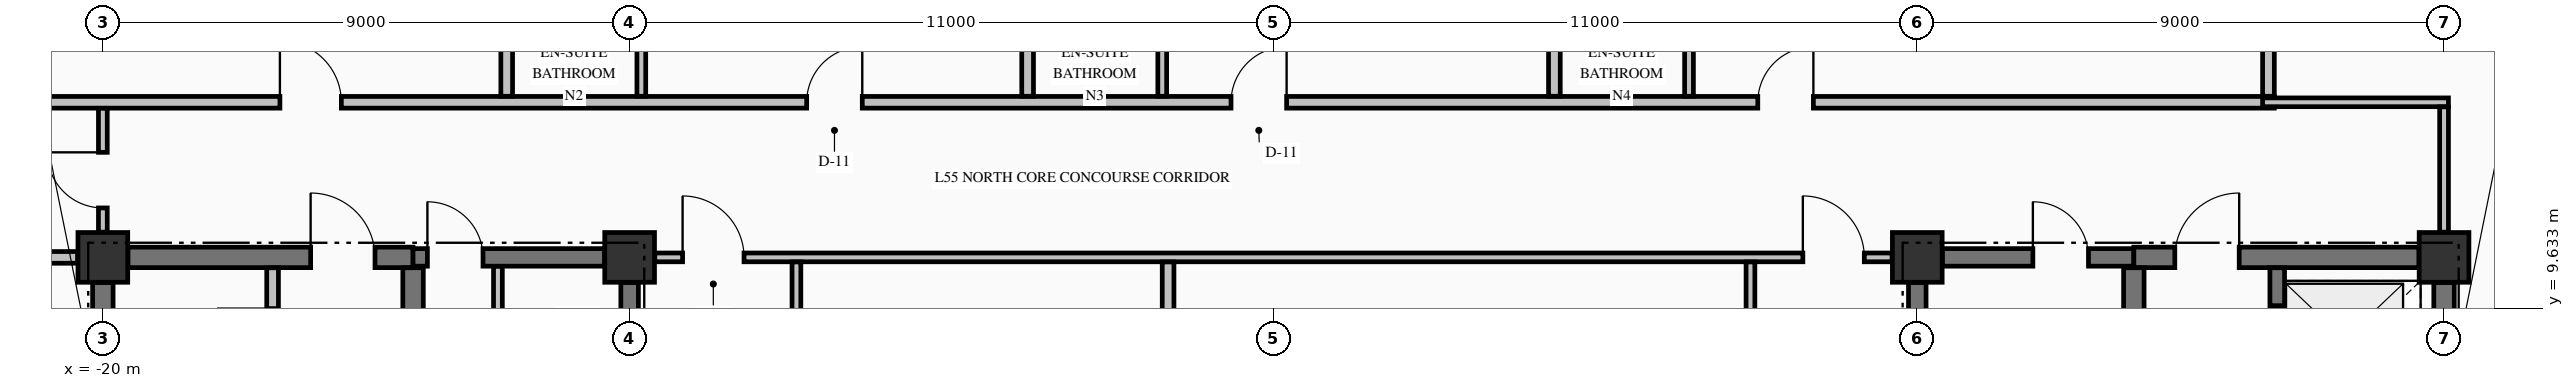
"""IFC4 building model, lengths in metres.
Left out: names, types, materials, properties, quantities, classifications, styles, units other than length and angle.
Written with IfcOpenShell. Run it as: python <this file> out.ifc"""

import sys

from ifc_helpers import new_model, si_unit, direction, frame, frame_2d, origin, origin_2d, place, context, subcontext, project, spatial, rectangle, extrude, element, fill, save


model = new_model("IFC4")
c1 = context("Model", 3, precision=1e-05, world=origin(), true_north=direction((0.0, 1.0)))
c2 = subcontext(c1, "Body", "Model", "MODEL_VIEW")
j1 = project(units=[si_unit("LENGTHUNIT", "METRE"), si_unit("PLANEANGLEUNIT", "RADIAN")], contexts=[c1])
p1 = place(None, origin())
s1 = spatial("IfcSite", under=j1, at=p1, CompositionType="ELEMENT")
p2 = place(p1, origin())
s2 = spatial("IfcBuilding", under=s1, at=p2, CompositionType="ELEMENT")
p3 = place(p2, frame((0.0, 0.0, 211.86)))
s3 = spatial("IfcBuildingStorey", under=s2, at=p3, CompositionType="ELEMENT", Elevation=211.86)
for number, where, z_axis, x_axis in (
    (1, (-20.0, 10.5, -0.325), (0.0, 0.0, 1.0), (1.0, 0.0, 0.0)),
    (2, (-11.0, 10.5, -0.325), (0.0, 0.0, 1.0), (1.0, 0.0, 0.0)),
    (3, (11.0, 10.5, -0.325), (0.0, 0.0, 1.0), (1.0, 0.0, 0.0)),
    (4, (20.0, 10.5, -0.325), (0.0, 0.0, 1.0), (1.0, 0.0, 0.0)),
):
    element("IfcColumn", number, at=place(p3, frame(where, z_axis=z_axis, x_axis=x_axis)), inside=s3, PredefinedType="COLUMN", context=c2, shape_type="SweptSolid", body=[
        extrude(rectangle(XDim=0.85, YDim=0.85, at=origin_2d()), origin(), (0.0, 0.0, 1.0), 3.475),
    ])
p4 = place(p3, frame((-19.571, 10.5, 0.0), z_axis=(0.0, 0.0, 1.0), x_axis=(1.0, 0.0, 0.0)))
e5 = element("IfcWall", 5, at=p4, inside=s3, PredefinedType="SHEAR", context=c2, shape_type="SweptSolid", body=[
    extrude(rectangle(XDim=4.871, YDim=0.35, at=frame_2d((2.436, 0.0))), origin(), (0.0, 0.0, 1.0), 3.15),
])
p5 = place(p4, frame((3.121, 0.0, 0.0)))
e6 = element("IfcOpeningElement", 6, at=p5, cuts=e5, PredefinedType="OPENING", context=c2, shape_type="SweptSolid", body=[
    extrude(rectangle(XDim=1.1, YDim=2.15, at=frame_2d((0.55, 1.075))), frame((0.0, 0.185, 0.0), z_axis=(0.0, -1.0, 0.0), x_axis=(1.0, 0.0, 0.0)), (0.0, 0.0, 1.0), 0.37),
])
p6 = place(p3, frame((-14.7, 10.5, 0.0), z_axis=(0.0, 0.0, 1.0), x_axis=(1.0, 0.0, 0.0)))
e7 = element("IfcWall", 7, at=p6, inside=s3, PredefinedType="SHEAR", context=c2, shape_type="SweptSolid", body=[
    extrude(rectangle(XDim=3.271, YDim=0.3, at=frame_2d((1.635, 0.0))), origin(), (0.0, 0.0, 1.0), 3.15),
])
p7 = place(p6, frame((0.245, 0.0, 0.0)))
e8 = element("IfcOpeningElement", 8, at=p7, cuts=e7, PredefinedType="OPENING", context=c2, shape_type="SweptSolid", body=[
    extrude(rectangle(XDim=0.95, YDim=2.15, at=frame_2d((0.475, 1.075))), frame((0.0, 0.16, 0.0), z_axis=(0.0, -1.0, 0.0), x_axis=(1.0, 0.0, 0.0)), (0.0, 0.0, 1.0), 0.32),
])
p8 = place(p3, frame((11.429, 10.5, 0.0), z_axis=(0.0, 0.0, 1.0), x_axis=(1.0, 0.0, 0.0)))
e9 = element("IfcWall", 9, at=p8, inside=s3, PredefinedType="SHEAR", context=c2, shape_type="SweptSolid", body=[
    extrude(rectangle(XDim=3.271, YDim=0.3, at=frame_2d((1.635, 0.0))), origin(), (0.0, 0.0, 1.0), 3.15),
])
p9 = place(p8, frame((1.546, 0.0, 0.0)))
e10 = element("IfcOpeningElement", 10, at=p9, cuts=e9, PredefinedType="OPENING", context=c2, shape_type="SweptSolid", body=[
    extrude(rectangle(XDim=0.95, YDim=2.15, at=frame_2d((0.475, 1.075))), frame((0.0, 0.16, 0.0), z_axis=(0.0, -1.0, 0.0), x_axis=(1.0, 0.0, 0.0)), (0.0, 0.0, 1.0), 0.32),
])
p10 = place(p3, frame((14.7, 10.5, 0.0), z_axis=(0.0, 0.0, 1.0), x_axis=(1.0, 0.0, 0.0)))
e11 = element("IfcWall", 11, at=p10, inside=s3, PredefinedType="SHEAR", context=c2, shape_type="SweptSolid", body=[
    extrude(rectangle(XDim=4.871, YDim=0.35, at=frame_2d((2.436, 0.0))), origin(), (0.0, 0.0, 1.0), 3.15),
])
p11 = place(p10, frame((0.7, 0.0, 0.0)))
e12 = element("IfcOpeningElement", 12, at=p11, cuts=e11, PredefinedType="OPENING", context=c2, shape_type="SweptSolid", body=[
    extrude(rectangle(XDim=1.1, YDim=2.15, at=frame_2d((0.55, 1.075))), frame((0.0, 0.185, 0.0), z_axis=(0.0, -1.0, 0.0), x_axis=(1.0, 0.0, 0.0)), (0.0, 0.0, 1.0), 0.37),
])
p12 = place(p3, frame((-26.835, 10.5, 0.0), z_axis=(0.0, 0.0, 1.0), x_axis=(1.0, 0.0, 0.0)))
e13 = element("IfcWall", 13, at=p12, inside=s3, PredefinedType="PARTITIONING", context=c2, shape_type="SweptSolid", body=[
    extrude(rectangle(XDim=6.404, YDim=0.2, at=frame_2d((3.202, 0.0))), origin(), (0.0, 0.0, 1.0), 3.15),
])
p13 = place(p12, frame((2.86, 0.0, 0.0)))
e14 = element("IfcOpeningElement", 14, at=p13, cuts=e13, PredefinedType="OPENING", context=c2, shape_type="SweptSolid", body=[
    extrude(rectangle(XDim=0.95, YDim=2.15, at=frame_2d((0.475, 1.075))), frame((0.0, 0.11, 0.0), z_axis=(0.0, -1.0, 0.0), x_axis=(1.0, 0.0, 0.0)), (0.0, 0.0, 1.0), 0.22),
])
p14 = place(p3, frame((-10.569, 10.5, 0.0), z_axis=(0.0, 0.0, 1.0), x_axis=(1.0, 0.0, 0.0)))
e15 = element("IfcWall", 15, at=p14, inside=s3, PredefinedType="PARTITIONING", context=c2, shape_type="SweptSolid", body=[
    extrude(rectangle(XDim=21.138, YDim=0.15, at=frame_2d((10.569, 0.0))), origin(), (0.0, 0.0, 1.0), 3.15),
])
p15 = place(p14, frame((0.474, 0.0, 0.0)))
e16 = element("IfcOpeningElement", 16, at=p15, cuts=e15, PredefinedType="OPENING", context=c2, shape_type="SweptSolid", body=[
    extrude(rectangle(XDim=1.05, YDim=2.15, at=frame_2d((0.525, 1.075))), frame((0.0, 0.085, 0.0), z_axis=(0.0, -1.0, 0.0), x_axis=(1.0, 0.0, 0.0)), (0.0, 0.0, 1.0), 0.17),
])
p16 = place(p14, frame((19.614, 0.0, 0.0)))
e17 = element("IfcOpeningElement", 17, at=p16, cuts=e15, PredefinedType="OPENING", context=c2, shape_type="SweptSolid", body=[
    extrude(rectangle(XDim=1.05, YDim=2.15, at=frame_2d((0.525, 1.075))), frame((0.0, 0.085, 0.0), z_axis=(0.0, -1.0, 0.0), x_axis=(1.0, 0.0, 0.0)), (0.0, 0.0, 1.0), 0.17),
])
p17 = place(p3, frame((-22.1, 13.15, 0.0), z_axis=(0.0, 0.0, 1.0), x_axis=(1.0, 0.0, 0.0)))
e18 = element("IfcWall", 18, at=p17, inside=s3, PredefinedType="PARTITIONING", context=c2, shape_type="SweptSolid", body=[
    extrude(rectangle(XDim=39.2, YDim=0.2, at=frame_2d((19.6, 0.0))), origin(), (0.0, 0.0, 1.0), 3.15),
])
p18 = place(p17, frame((5.125, 0.0, 0.0)))
e19 = element("IfcOpeningElement", 19, at=p18, cuts=e18, PredefinedType="OPENING", context=c2, shape_type="SweptSolid", body=[
    extrude(rectangle(XDim=1.05, YDim=2.15, at=frame_2d((0.525, 1.075))), frame((0.0, 0.11, 0.0), z_axis=(0.0, -1.0, 0.0), x_axis=(1.0, 0.0, 0.0)), (0.0, 0.0, 1.0), 0.22),
])
p19 = place(p17, frame((14.125, 0.0, 0.0)))
e20 = element("IfcOpeningElement", 20, at=p19, cuts=e18, PredefinedType="OPENING", context=c2, shape_type="SweptSolid", body=[
    extrude(rectangle(XDim=0.95, YDim=2.15, at=frame_2d((0.475, 1.075))), frame((0.0, 0.11, 0.0), z_axis=(0.0, -1.0, 0.0), x_axis=(1.0, 0.0, 0.0)), (0.0, 0.0, 1.0), 0.22),
])
p20 = place(p17, frame((21.375, 0.0, 0.0)))
e21 = element("IfcOpeningElement", 21, at=p20, cuts=e18, PredefinedType="OPENING", context=c2, shape_type="SweptSolid", body=[
    extrude(rectangle(XDim=0.95, YDim=2.15, at=frame_2d((0.475, 1.075))), frame((0.0, 0.11, 0.0), z_axis=(0.0, -1.0, 0.0), x_axis=(1.0, 0.0, 0.0)), (0.0, 0.0, 1.0), 0.22),
])
p21 = place(p17, frame((30.375, 0.0, 0.0)))
e22 = element("IfcOpeningElement", 22, at=p21, cuts=e18, PredefinedType="OPENING", context=c2, shape_type="SweptSolid", body=[
    extrude(rectangle(XDim=0.95, YDim=2.15, at=frame_2d((0.475, 1.075))), frame((0.0, 0.11, 0.0), z_axis=(0.0, -1.0, 0.0), x_axis=(1.0, 0.0, 0.0)), (0.0, 0.0, 1.0), 0.22),
])
p22 = place(p3, frame((16.9, 13.15, 0.0), z_axis=(0.0, 0.0, 1.0), x_axis=(1.0, 0.0, 0.0)))
e23 = element("IfcWall", 23, at=p22, inside=s3, PredefinedType="PARTITIONING", context=c2, shape_type="SweptSolid", body=[
    extrude(rectangle(XDim=3.175, YDim=0.15, at=frame_2d((1.587, 0.0))), origin(), (0.0, 0.0, 1.0), 3.15),
])
p23 = place(p3, frame((-20.0, 5.327, 0.0), z_axis=(0.0, 0.0, 1.0), x_axis=(0.0, 1.0, 0.0)))
e24 = element("IfcWall", 24, at=p23, inside=s3, PredefinedType="SHEAR", context=c2, shape_type="SweptSolid", body=[
    extrude(rectangle(XDim=4.744, YDim=0.35, at=frame_2d((2.372, 0.0))), origin(), (0.0, 0.0, 1.0), 3.15),
])
p24 = place(p3, frame((-14.7, 5.852, 0.0), z_axis=(0.0, 0.0, 1.0), x_axis=(0.0, 1.0, 0.0)))
e25 = element("IfcWall", 25, at=p24, inside=s3, PredefinedType="SHEAR", context=c2, shape_type="SweptSolid", body=[
    extrude(rectangle(XDim=4.471, YDim=0.35, at=frame_2d((2.235, 0.0))), origin(), (0.0, 0.0, 1.0), 3.15),
])
for number, where, z_axis, x_axis in (
    (26, (-11.0, 5.852, 0.0), (0.0, 0.0, 1.0), (0.0, 1.0, 0.0)),
    (27, (11.0, 5.852, 0.0), (0.0, 0.0, 1.0), (0.0, 1.0, 0.0)),
):
    element("IfcWall", number, at=place(p3, frame(where, z_axis=z_axis, x_axis=x_axis)), inside=s3, PredefinedType="SHEAR", context=c2, shape_type="SweptSolid", body=[
        extrude(rectangle(XDim=4.219, YDim=0.3, at=frame_2d((2.109, 0.0))), origin(), (0.0, 0.0, 1.0), 3.15),
    ])
p25 = place(p3, frame((14.7, 5.852, 0.0), z_axis=(0.0, 0.0, 1.0), x_axis=(0.0, 1.0, 0.0)))
e28 = element("IfcWall", 28, at=p25, inside=s3, PredefinedType="SHEAR", context=c2, shape_type="SweptSolid", body=[
    extrude(rectangle(XDim=4.471, YDim=0.35, at=frame_2d((2.235, 0.0))), origin(), (0.0, 0.0, 1.0), 3.15),
])
p26 = place(p3, frame((17.15, 7.877, 0.0), z_axis=(0.0, 0.0, 1.0), x_axis=(0.0, 1.0, 0.0)))
e29 = element("IfcWall", 29, at=p26, inside=s3, PredefinedType="SOLIDWALL", context=c2, shape_type="SweptSolid", body=[
    extrude(rectangle(XDim=2.446, YDim=0.25, at=frame_2d((1.223, 0.0))), origin(), (0.0, 0.0, 1.0), 3.15),
])
p27 = place(p26, frame((0.698, 0.0, 0.0)))
e30 = element("IfcOpeningElement", 30, at=p27, cuts=e29, PredefinedType="OPENING", context=c2, shape_type="SweptSolid", body=[
    extrude(rectangle(XDim=1.1, YDim=2.2, at=frame_2d((0.55, 1.1))), frame((0.0, 0.135, 0.0), z_axis=(0.0, -1.0, 0.0), x_axis=(1.0, 0.0, 0.0)), (0.0, 0.0, 1.0), 0.27),
])
p28 = place(p3, frame((20.0, 7.877, 0.0), z_axis=(0.0, 0.0, 1.0), x_axis=(0.0, 1.0, 0.0)))
e31 = element("IfcWall", 31, at=p28, inside=s3, PredefinedType="SHEAR", context=c2, shape_type="SweptSolid", body=[
    extrude(rectangle(XDim=2.194, YDim=0.35, at=frame_2d((1.097, 0.0))), origin(), (0.0, 0.0, 1.0), 3.15),
])
p29 = place(p3, frame((-20.0, 10.931, 0.0), z_axis=(0.0, 0.0, 1.0), x_axis=(0.0, 1.0, 0.0)))
e32 = element("IfcWall", 32, at=p29, inside=s3, PredefinedType="PARTITIONING", context=c2, shape_type="SweptSolid", body=[
    extrude(rectangle(XDim=2.116, YDim=0.15, at=frame_2d((1.058, 0.0))), origin(), (0.0, 0.0, 1.0), 2.342),
])
p30 = place(p29, frame((0.414, 0.0, 0.0)))
e33 = element("IfcOpeningElement", 33, at=p30, cuts=e32, PredefinedType="OPENING", context=c2, shape_type="SweptSolid", body=[
    extrude(rectangle(XDim=0.95, YDim=2.15, at=frame_2d((0.475, 1.075))), frame((0.0, 0.085, 0.0), z_axis=(0.0, -1.0, 0.0), x_axis=(1.0, 0.0, 0.0)), (0.0, 0.0, 1.0), 0.17),
])
p31 = place(p3, frame((-17.1, 7.928, 0.0), z_axis=(0.0, 0.0, 1.0), x_axis=(0.0, 1.0, 0.0)))
e34 = element("IfcWall", 34, at=p31, inside=s3, PredefinedType="PARTITIONING", context=c2, shape_type="SweptSolid", body=[
    extrude(rectangle(XDim=2.394, YDim=0.2, at=frame_2d((1.197, 0.0))), origin(), (0.0, 0.0, 1.0), 3.15),
])
p32 = place(p31, frame((0.747, 0.0, 0.0)))
e35 = element("IfcOpeningElement", 35, at=p32, cuts=e34, PredefinedType="OPENING", context=c2, shape_type="SweptSolid", body=[
    extrude(rectangle(XDim=0.95, YDim=2.15, at=frame_2d((0.475, 1.075))), frame((0.0, 0.11, 0.0), z_axis=(0.0, -1.0, 0.0), x_axis=(1.0, 0.0, 0.0)), (0.0, 0.0, 1.0), 0.22),
])
p33 = place(p3, frame((-13.25, 5.853, 0.0), z_axis=(0.0, 0.0, 1.0), x_axis=(0.0, 1.0, 0.0)))
e36 = element("IfcWall", 36, at=p33, inside=s3, PredefinedType="PARTITIONING", context=c2, shape_type="SweptSolid", body=[
    extrude(rectangle(XDim=4.494, YDim=0.15, at=frame_2d((2.247, 0.0))), origin(), (0.0, 0.0, 1.0), 3.15),
])
p34 = place(p33, frame((1.472, 0.0, 0.0)))
e37 = element("IfcOpeningElement", 37, at=p34, cuts=e36, PredefinedType="OPENING", context=c2, shape_type="SweptSolid", body=[
    extrude(rectangle(XDim=0.95, YDim=2.15, at=frame_2d((0.475, 1.075))), frame((0.0, 0.085, 0.0), z_axis=(0.0, -1.0, 0.0), x_axis=(1.0, 0.0, 0.0)), (0.0, 0.0, 1.0), 0.17),
])
p35 = place(p3, frame((-13.1, 13.253, 0.0), z_axis=(0.0, 0.0, 1.0), x_axis=(0.0, 1.0, 0.0)))
e38 = element("IfcWall", 38, at=p35, inside=s3, PredefinedType="PARTITIONING", context=c2, shape_type="SweptSolid", body=[
    extrude(rectangle(XDim=2.069, YDim=0.2, at=frame_2d((1.035, 0.0))), origin(), (0.0, 0.0, 1.0), 3.15),
])
p36 = place(p3, frame((-10.8, 13.253, 0.0), z_axis=(0.0, 0.0, 1.0), x_axis=(0.0, 1.0, 0.0)))
e39 = element("IfcWall", 39, at=p36, inside=s3, PredefinedType="PARTITIONING", context=c2, shape_type="SweptSolid", body=[
    extrude(rectangle(XDim=2.069, YDim=0.15, at=frame_2d((1.035, 0.0))), origin(), (0.0, 0.0, 1.0), 2.342),
])
p37 = place(p3, frame((-8.15, -2.497, 0.0), z_axis=(0.0, 0.0, 1.0), x_axis=(0.0, 1.0, 0.0)))
e40 = element("IfcWall", 40, at=p37, inside=s3, PredefinedType="PARTITIONING", context=c2, shape_type="SweptSolid", body=[
    extrude(rectangle(XDim=12.919, YDim=0.15, at=frame_2d((6.459, 0.0))), origin(), (0.0, 0.0, 1.0), 3.15),
])
p38 = place(p37, frame((5.897, 0.0, 0.0)))
e41 = element("IfcOpeningElement", 41, at=p38, cuts=e40, PredefinedType="OPENING", context=c2, shape_type="SweptSolid", body=[
    extrude(rectangle(XDim=1.1, YDim=2.15, at=frame_2d((0.55, 1.075))), frame((0.0, 0.085, 0.0), z_axis=(0.0, -1.0, 0.0), x_axis=(1.0, 0.0, 0.0)), (0.0, 0.0, 1.0), 0.17),
])
p39 = place(p3, frame((-4.2, 13.253, 0.0), z_axis=(0.0, 0.0, 1.0), x_axis=(0.0, 1.0, 0.0)))
e42 = element("IfcWall", 42, at=p39, inside=s3, PredefinedType="PARTITIONING", context=c2, shape_type="SweptSolid", body=[
    extrude(rectangle(XDim=2.069, YDim=0.2, at=frame_2d((1.035, 0.0))), origin(), (0.0, 0.0, 1.0), 3.15),
])
p40 = place(p3, frame((-1.9, 13.253, 0.0), z_axis=(0.0, 0.0, 1.0), x_axis=(0.0, 1.0, 0.0)))
e43 = element("IfcWall", 43, at=p40, inside=s3, PredefinedType="PARTITIONING", context=c2, shape_type="SweptSolid", body=[
    extrude(rectangle(XDim=2.069, YDim=0.15, at=frame_2d((1.035, 0.0))), origin(), (0.0, 0.0, 1.0), 3.15),
])
p41 = place(p3, frame((-1.8, -1.497, 0.0), z_axis=(0.0, 0.0, 1.0), x_axis=(0.0, 1.0, 0.0)))
e44 = element("IfcWall", 44, at=p41, inside=s3, PredefinedType="PARTITIONING", context=c2, shape_type="SweptSolid", body=[
    extrude(rectangle(XDim=11.919, YDim=0.2, at=frame_2d((5.959, 0.0))), origin(), (0.0, 0.0, 1.0), 3.15),
])
p42 = place(p3, frame((4.8, 13.253, 0.0), z_axis=(0.0, 0.0, 1.0), x_axis=(0.0, 1.0, 0.0)))
e45 = element("IfcWall", 45, at=p42, inside=s3, PredefinedType="PARTITIONING", context=c2, shape_type="SweptSolid", body=[
    extrude(rectangle(XDim=2.069, YDim=0.2, at=frame_2d((1.035, 0.0))), origin(), (0.0, 0.0, 1.0), 3.15),
])
p43 = place(p3, frame((7.1, 13.253, 0.0), z_axis=(0.0, 0.0, 1.0), x_axis=(0.0, 1.0, 0.0)))
e46 = element("IfcWall", 46, at=p43, inside=s3, PredefinedType="PARTITIONING", context=c2, shape_type="SweptSolid", body=[
    extrude(rectangle(XDim=2.069, YDim=0.15, at=frame_2d((1.035, 0.0))), origin(), (0.0, 0.0, 1.0), 3.15),
])
p44 = place(p3, frame((8.15, -1.497, 0.0), z_axis=(0.0, 0.0, 1.0), x_axis=(0.0, 1.0, 0.0)))
e47 = element("IfcWall", 47, at=p44, inside=s3, PredefinedType="PARTITIONING", context=c2, shape_type="SweptSolid", body=[
    extrude(rectangle(XDim=11.919, YDim=0.15, at=frame_2d((5.959, 0.0))), origin(), (0.0, 0.0, 1.0), 3.15),
])
p45 = place(p44, frame((5.397, 0.0, 0.0)))
e48 = element("IfcOpeningElement", 48, at=p45, cuts=e47, PredefinedType="OPENING", context=c2, shape_type="SweptSolid", body=[
    extrude(rectangle(XDim=1.1, YDim=2.15, at=frame_2d((0.55, 1.075))), frame((0.0, 0.085, 0.0), z_axis=(0.0, -1.0, 0.0), x_axis=(1.0, 0.0, 0.0)), (0.0, 0.0, 1.0), 0.17),
])
p46 = place(p3, frame((17.0, 13.253, 0.0), z_axis=(0.0, 0.0, 1.0), x_axis=(0.0, 1.0, 0.0)))
e49 = element("IfcWall", 49, at=p46, inside=s3, PredefinedType="PARTITIONING", context=c2, shape_type="SweptSolid", body=[
    extrude(rectangle(XDim=5.741, YDim=0.2, at=frame_2d((2.871, 0.0))), origin(), (0.0, 0.0, 1.0), 3.15),
])
p47 = place(p3, frame((20.0, 10.931, 0.0), z_axis=(0.0, 0.0, 1.0), x_axis=(0.0, 1.0, 0.0)))
e50 = element("IfcWall", 50, at=p47, inside=s3, PredefinedType="PARTITIONING", context=c2, shape_type="SweptSolid", body=[
    extrude(rectangle(XDim=2.141, YDim=0.15, at=frame_2d((1.071, 0.0))), origin(), (0.0, 0.0, 1.0), 2.342),
])
p48 = place(p7, origin())
e51 = element("IfcDoor", 51, at=p48, inside=s3, OperationType="SINGLE_SWING_LEFT", PredefinedType="DOOR", context=c2, shape_type="SweptSolid", body=[
    extrude(rectangle(XDim=0.95, YDim=2.15, at=frame_2d((0.475, 1.075))), frame((0.0, 0.025, 0.0), z_axis=(0.0, -1.0, 0.0), x_axis=(1.0, 0.0, 0.0)), (0.0, 0.0, 1.0), 0.05),
])
fill(e8, e51)
p49 = place(p9, origin())
e52 = element("IfcDoor", 52, at=p49, inside=s3, OperationType="SINGLE_SWING_LEFT", PredefinedType="DOOR", context=c2, shape_type="SweptSolid", body=[
    extrude(rectangle(XDim=0.95, YDim=2.15, at=frame_2d((0.475, 1.075))), frame((0.0, 0.025, 0.0), z_axis=(0.0, -1.0, 0.0), x_axis=(1.0, 0.0, 0.0)), (0.0, 0.0, 1.0), 0.05),
])
fill(e10, e52)
p50 = place(p5, origin())
e53 = element("IfcDoor", 53, at=p50, inside=s3, OperationType="SINGLE_SWING_LEFT", PredefinedType="DOOR", context=c2, shape_type="SweptSolid", body=[
    extrude(rectangle(XDim=1.1, YDim=2.15, at=frame_2d((0.55, 1.075))), frame((0.0, 0.025, 0.0), z_axis=(0.0, -1.0, 0.0), x_axis=(1.0, 0.0, 0.0)), (0.0, 0.0, 1.0), 0.05),
])
fill(e6, e53)
p51 = place(p27, origin())
e54 = element("IfcDoor", 54, at=p51, inside=s3, OperationType="SLIDING_TO_RIGHT", PredefinedType="DOOR", context=c2, shape_type="SweptSolid", body=[
    extrude(rectangle(XDim=1.1, YDim=2.2, at=frame_2d((0.55, 1.1))), frame((0.0, 0.025, 0.0), z_axis=(0.0, -1.0, 0.0), x_axis=(1.0, 0.0, 0.0)), (0.0, 0.0, 1.0), 0.05),
])
fill(e30, e54)
p52 = place(p11, origin())
e55 = element("IfcDoor", 55, at=p52, inside=s3, OperationType="SINGLE_SWING_RIGHT", PredefinedType="DOOR", context=c2, shape_type="SweptSolid", body=[
    extrude(rectangle(XDim=1.1, YDim=2.15, at=frame_2d((0.55, 1.075))), frame((0.0, 0.025, 0.0), z_axis=(0.0, -1.0, 0.0), x_axis=(1.0, 0.0, 0.0)), (0.0, 0.0, 1.0), 0.05),
])
fill(e12, e55)
p53 = place(p15, origin())
e56 = element("IfcDoor", 56, at=p53, inside=s3, OperationType="SINGLE_SWING_LEFT", PredefinedType="DOOR", context=c2, shape_type="SweptSolid", body=[
    extrude(rectangle(XDim=1.05, YDim=2.15, at=frame_2d((0.525, 1.075))), frame((0.0, 0.025, 0.0), z_axis=(0.0, -1.0, 0.0), x_axis=(1.0, 0.0, 0.0)), (0.0, 0.0, 1.0), 0.05),
])
fill(e16, e56)
p54 = place(p16, origin())
e57 = element("IfcDoor", 57, at=p54, inside=s3, OperationType="SINGLE_SWING_LEFT", PredefinedType="DOOR", context=c2, shape_type="SweptSolid", body=[
    extrude(rectangle(XDim=1.05, YDim=2.15, at=frame_2d((0.525, 1.075))), frame((0.0, 0.025, 0.0), z_axis=(0.0, -1.0, 0.0), x_axis=(1.0, 0.0, 0.0)), (0.0, 0.0, 1.0), 0.05),
])
fill(e17, e57)
p55 = place(p18, origin())
e58 = element("IfcDoor", 58, at=p55, inside=s3, OperationType="SINGLE_SWING_LEFT", PredefinedType="DOOR", context=c2, shape_type="SweptSolid", body=[
    extrude(rectangle(XDim=1.05, YDim=2.15, at=frame_2d((0.525, 1.075))), frame((0.0, 0.025, 0.0), z_axis=(0.0, -1.0, 0.0), x_axis=(1.0, 0.0, 0.0)), (0.0, 0.0, 1.0), 0.05),
])
fill(e19, e58)
p56 = place(p19, origin())
e59 = element("IfcDoor", 59, at=p56, inside=s3, OperationType="SINGLE_SWING_RIGHT", PredefinedType="DOOR", context=c2, shape_type="SweptSolid", body=[
    extrude(rectangle(XDim=0.95, YDim=2.15, at=frame_2d((0.475, 1.075))), frame((0.0, 0.025, 0.0), z_axis=(0.0, -1.0, 0.0), x_axis=(1.0, 0.0, 0.0)), (0.0, 0.0, 1.0), 0.05),
])
fill(e20, e59)
p57 = place(p20, origin())
e60 = element("IfcDoor", 60, at=p57, inside=s3, OperationType="SINGLE_SWING_RIGHT", PredefinedType="DOOR", context=c2, shape_type="SweptSolid", body=[
    extrude(rectangle(XDim=0.95, YDim=2.15, at=frame_2d((0.475, 1.075))), frame((0.0, 0.025, 0.0), z_axis=(0.0, -1.0, 0.0), x_axis=(1.0, 0.0, 0.0)), (0.0, 0.0, 1.0), 0.05),
])
fill(e21, e60)
p58 = place(p21, origin())
e61 = element("IfcDoor", 61, at=p58, inside=s3, OperationType="SINGLE_SWING_RIGHT", PredefinedType="DOOR", context=c2, shape_type="SweptSolid", body=[
    extrude(rectangle(XDim=0.95, YDim=2.15, at=frame_2d((0.475, 1.075))), frame((0.0, 0.025, 0.0), z_axis=(0.0, -1.0, 0.0), x_axis=(1.0, 0.0, 0.0)), (0.0, 0.0, 1.0), 0.05),
])
fill(e22, e61)
p59 = place(p30, origin())
e62 = element("IfcDoor", 62, at=p59, inside=s3, OperationType="SINGLE_SWING_RIGHT", PredefinedType="DOOR", context=c2, shape_type="SweptSolid", body=[
    extrude(rectangle(XDim=0.95, YDim=2.15, at=frame_2d((0.475, 1.075))), frame((0.0, 0.025, 0.0), z_axis=(0.0, -1.0, 0.0), x_axis=(1.0, 0.0, 0.0)), (0.0, 0.0, 1.0), 0.05),
])
fill(e33, e62)
save(model, sys.argv[1])
